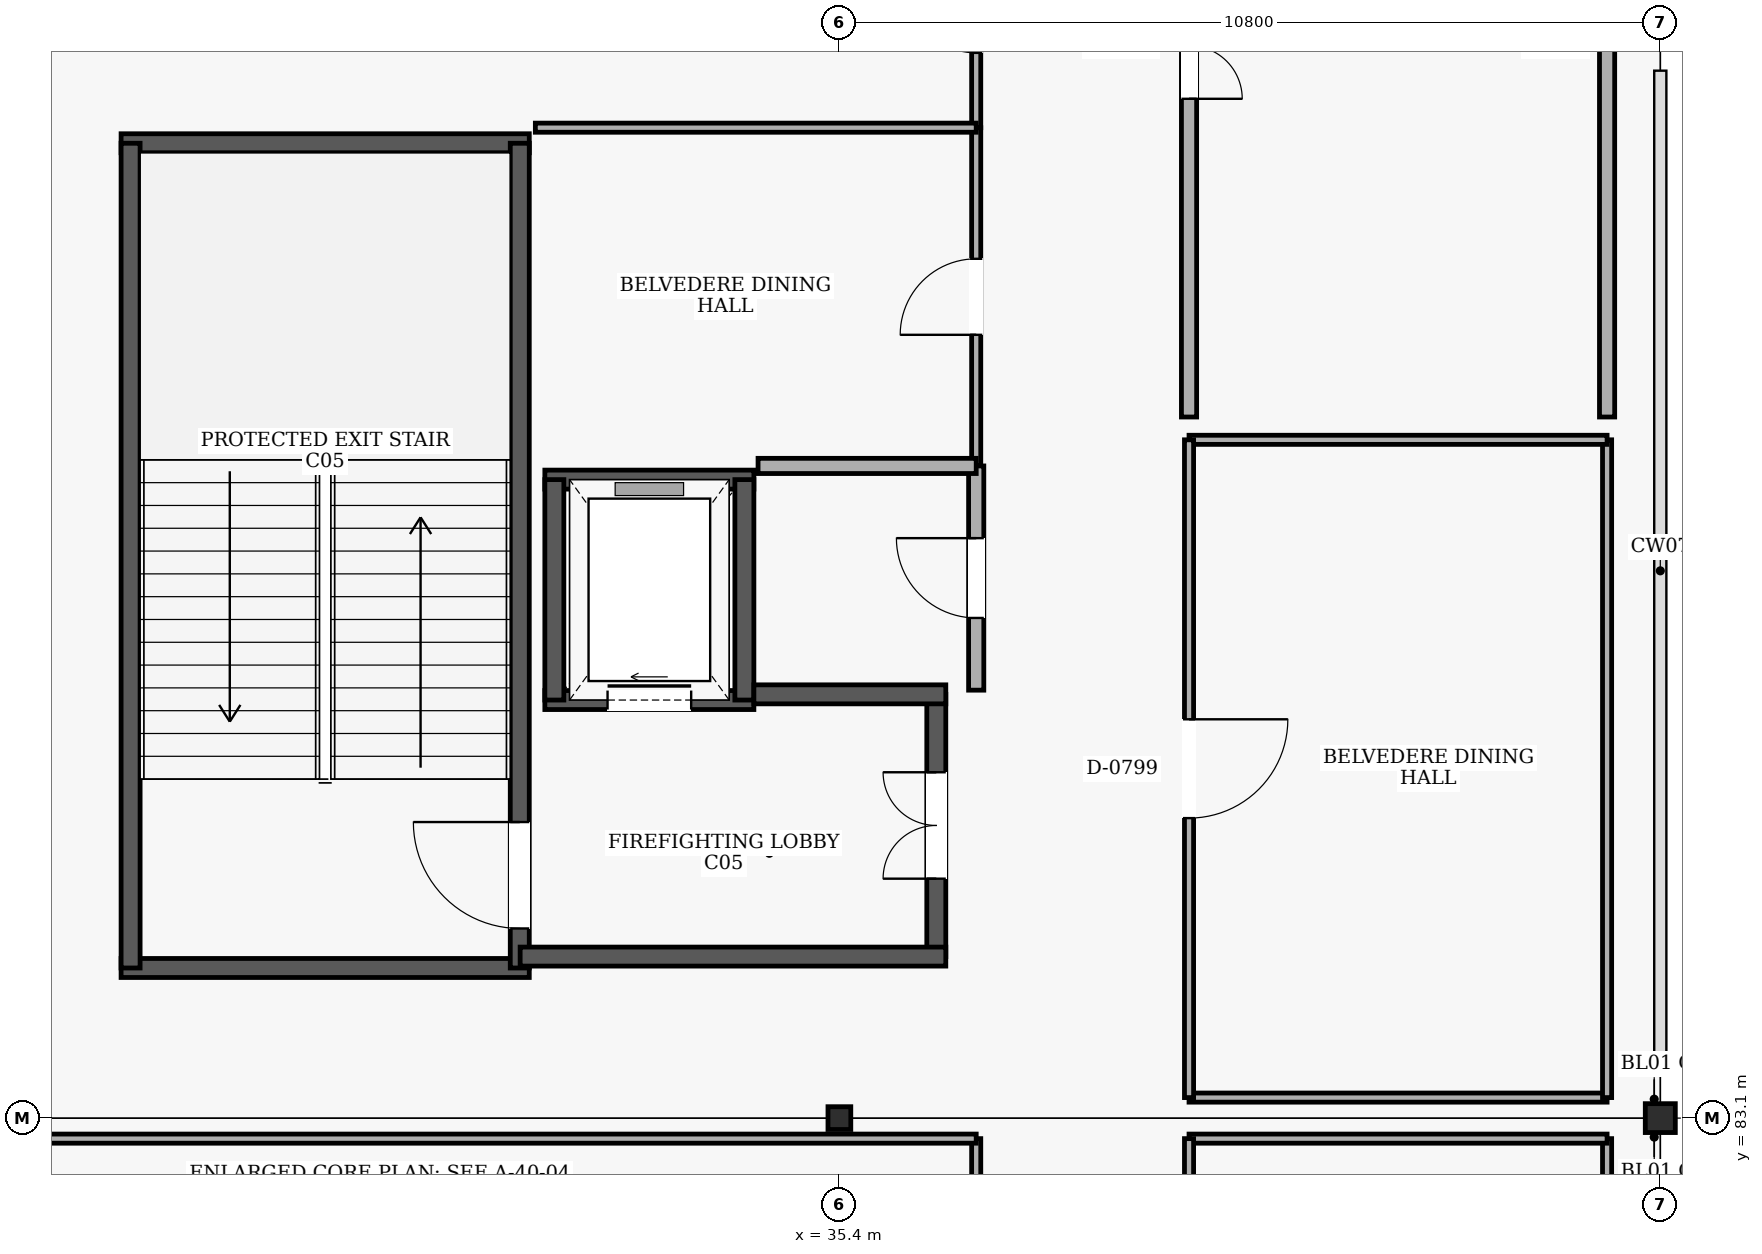
"""IFC4 building model, lengths in metres.
Left out: names, types, materials, properties, quantities, classifications, styles, units other than length and angle.
Written with IfcOpenShell. Run it as: python <this file> out.ifc"""

import sys

from ifc_helpers import new_model, si_unit, direction, frame, frame_2d, origin, origin_2d, place, context, subcontext, project, spatial, rectangle, hollow_rectangle, i_section, extrude, element, fill, save


model = new_model("IFC4")
c1 = context("Model", 3, precision=1e-05, world=origin(), true_north=direction((0.0, 1.0)))
c2 = subcontext(c1, "Body", "Model", "MODEL_VIEW")
j1 = project(units=[si_unit("LENGTHUNIT", "METRE"), si_unit("PLANEANGLEUNIT", "RADIAN")], contexts=[c1])
p1 = place(None, origin())
s1 = spatial("IfcSite", under=j1, at=p1, CompositionType="ELEMENT")
p2 = place(p1, origin())
s2 = spatial("IfcBuilding", under=s1, at=p2, CompositionType="ELEMENT")
p3 = place(p2, frame((0.0, 0.0, 24.6)))
s3 = spatial("IfcBuildingStorey", under=s2, at=p3, CompositionType="ELEMENT", Elevation=24.6)
p4 = place(p3, frame((35.4, 83.1, 0.0), z_axis=(0.0, 0.0, 1.0), x_axis=(1.0, 0.0, 0.0)))
e1 = element("IfcColumn", 1, at=p4, inside=s3, PredefinedType="COLUMN", context=c2, shape_type="SweptSolid", body=[
    extrude(hollow_rectangle(XDim=0.3, YDim=0.3, WallThickness=0.016, at=origin_2d()), origin(), (0.0, 0.0, 1.0), 4.8),
])
p5 = place(p3, frame((46.2, 83.1, 0.0), z_axis=(0.0, 0.0, 1.0), x_axis=(1.0, 0.0, 0.0)))
e2 = element("IfcColumn", 2, at=p5, inside=s3, PredefinedType="COLUMN", context=c2, shape_type="SweptSolid", body=[
    extrude(i_section(OverallWidth=0.395, OverallDepth=0.38, WebThickness=0.019, FlangeThickness=0.03, at=origin_2d()), origin(), (0.0, 0.0, 1.0), 4.8),
])
for number, where, z_axis, x_axis in (
    (3, (25.95, 85.075, 0.0), (0.0, 0.0, 1.0), (1.0, 0.0, 0.0)),
    (4, (31.32, 95.925, 0.0), (0.0, 0.0, 1.0), (-1.0, 0.0, 0.0)),
):
    element("IfcWall", number, at=place(p3, frame(where, z_axis=z_axis, x_axis=x_axis)), inside=s3, PredefinedType="SHEAR", context=c2, shape_type="SweptSolid", body=[
        extrude(rectangle(XDim=5.37, YDim=0.25, at=frame_2d((2.685, 0.0))), origin(), (0.0, 0.0, 1.0), 4.5),
    ])
p6 = place(p3, frame((26.075, 85.075, 0.0), z_axis=(0.0, 0.0, 1.0), x_axis=(0.0, 1.0, 0.0)))
e5 = element("IfcWall", 5, at=p6, inside=s3, PredefinedType="SHEAR", context=c2, shape_type="SweptSolid", body=[
    extrude(rectangle(XDim=10.85, YDim=0.25, at=frame_2d((5.425, 0.0))), origin(), (0.0, 0.0, 1.0), 4.5),
])
p7 = place(p3, frame((31.195, 85.075, 0.0), z_axis=(0.0, 0.0, 1.0), x_axis=(0.0, 1.0, 0.0)))
e6 = element("IfcWall", 6, at=p7, inside=s3, PredefinedType="SHEAR", context=c2, shape_type="SweptSolid", body=[
    extrude(rectangle(XDim=10.85, YDim=0.25, at=frame_2d((5.425, 0.0))), origin(), (0.0, 0.0, 1.0), 4.5),
])
p8 = place(p7, frame((0.52, 0.0, 0.0)))
e7 = element("IfcOpeningElement", 7, at=p8, cuts=e6, PredefinedType="OPENING", context=c2, shape_type="SweptSolid", body=[
    extrude(rectangle(XDim=1.4, YDim=2.15, at=frame_2d((0.7, 1.075))), frame((0.0, 0.135, 0.0), z_axis=(0.0, -1.0, 0.0), x_axis=(1.0, 0.0, 0.0)), (0.0, 0.0, 1.0), 0.27),
])
p9 = place(p3, frame((31.525, 88.6, 0.0), z_axis=(0.0, 0.0, 1.0), x_axis=(1.0, 0.0, 0.0)))
e8 = element("IfcWall", 8, at=p9, inside=s3, PredefinedType="SHEAR", context=c2, shape_type="SweptSolid", body=[
    extrude(rectangle(XDim=2.75, YDim=0.25, at=frame_2d((1.375, 0.0))), origin(), (0.0, 0.0, 1.0), 4.5),
])
p10 = place(p9, frame((0.825, 0.0, 0.0)))
e9 = element("IfcOpeningElement", 9, at=p10, cuts=e8, PredefinedType="OPENING", context=c2, shape_type="SweptSolid", body=[
    extrude(rectangle(XDim=1.1, YDim=2.15, at=frame_2d((0.55, 1.075))), frame((0.0, 0.135, 0.0), z_axis=(0.0, -1.0, 0.0), x_axis=(1.0, 0.0, 0.0)), (0.0, 0.0, 1.0), 0.27),
])
p11 = place(p3, frame((34.275, 91.5, 0.0), z_axis=(0.0, 0.0, 1.0), x_axis=(-1.0, 0.0, 0.0)))
e10 = element("IfcWall", 10, at=p11, inside=s3, PredefinedType="SHEAR", context=c2, shape_type="SweptSolid", body=[
    extrude(rectangle(XDim=2.75, YDim=0.25, at=frame_2d((1.375, 0.0))), origin(), (0.0, 0.0, 1.0), 4.5),
])
for number, where, z_axis, x_axis in (
    (11, (31.65, 91.5, 0.0), (0.0, 0.0, 1.0), (0.0, -1.0, 0.0)),
    (12, (34.15, 88.6, 0.0), (0.0, 0.0, 1.0), (0.0, 1.0, 0.0)),
):
    element("IfcWall", number, at=place(p3, frame(where, z_axis=z_axis, x_axis=x_axis)), inside=s3, PredefinedType="SHEAR", context=c2, shape_type="SweptSolid", body=[
        extrude(rectangle(XDim=2.9, YDim=0.25, at=frame_2d((1.45, 0.0))), origin(), (0.0, 0.0, 1.0), 4.5),
    ])
p12 = place(p3, frame((36.675, 85.225, 0.0), z_axis=(0.0, 0.0, 1.0), x_axis=(0.0, 1.0, 0.0)))
e13 = element("IfcWall", 13, at=p12, inside=s3, PredefinedType="SHEAR", context=c2, shape_type="SweptSolid", body=[
    extrude(rectangle(XDim=3.45, YDim=0.25, at=frame_2d((1.725, 0.0))), origin(), (0.0, 0.0, 1.0), 4.5),
])
p13 = place(p12, frame((1.025, 0.0, 0.0)))
e14 = element("IfcOpeningElement", 14, at=p13, cuts=e13, PredefinedType="OPENING", context=c2, shape_type="SweptSolid", body=[
    extrude(rectangle(XDim=1.4, YDim=2.15, at=frame_2d((0.7, 1.075))), frame((0.0, 0.135, 0.0), z_axis=(0.0, -1.0, 0.0), x_axis=(1.0, 0.0, 0.0)), (0.0, 0.0, 1.0), 0.27),
])
p14 = place(p3, frame((34.275, 88.675, 0.0), z_axis=(0.0, 0.0, 1.0), x_axis=(1.0, 0.0, 0.0)))
e15 = element("IfcWall", 15, at=p14, inside=s3, PredefinedType="SHEAR", context=c2, shape_type="SweptSolid", body=[
    extrude(rectangle(XDim=2.525, YDim=0.25, at=frame_2d((1.263, 0.0))), origin(), (0.0, 0.0, 1.0), 4.5),
])
p15 = place(p3, frame((31.2, 85.225, 0.0), z_axis=(0.0, 0.0, 1.0), x_axis=(1.0, 0.0, 0.0)))
e16 = element("IfcWall", 16, at=p15, inside=s3, PredefinedType="SHEAR", context=c2, shape_type="SweptSolid", body=[
    extrude(rectangle(XDim=5.6, YDim=0.25, at=frame_2d((2.8, 0.0))), origin(), (0.0, 0.0, 1.0), 4.5),
])
p16 = place(p3, frame((37.2, 79.73, 0.0), z_axis=(0.0, 0.0, 1.0), x_axis=(0.0, 1.0, 0.0)))
e17 = element("IfcWall", 17, at=p16, inside=s3, PredefinedType="PARTITIONING", context=c2, shape_type="SweptSolid", body=[
    extrude(rectangle(XDim=3.1, YDim=0.12, at=frame_2d((1.55, 0.0))), origin(), (0.0, 0.0, 1.0), 4.5),
])
p17 = place(p16, frame((1.07, 0.0, 0.0)))
e18 = element("IfcOpeningElement", 18, at=p17, cuts=e17, PredefinedType="OPENING", context=c2, shape_type="SweptSolid", body=[
    extrude(rectangle(XDim=0.96, YDim=2.1, at=frame_2d((0.48, 1.05))), frame((0.0, 0.07, 0.0), z_axis=(0.0, -1.0, 0.0), x_axis=(1.0, 0.0, 0.0)), (0.0, 0.0, 1.0), 0.14),
])
p18 = place(p3, frame((37.2, 82.83, 0.0), z_axis=(0.0, 0.0, 1.0), x_axis=(-1.0, 0.0, 0.0)))
e19 = element("IfcWall", 19, at=p18, inside=s3, PredefinedType="PARTITIONING", context=c2, shape_type="SweptSolid", body=[
    extrude(rectangle(XDim=12.355, YDim=0.12, at=frame_2d((6.177, 0.0))), origin(), (0.0, 0.0, 1.0), 3.78),
])
p19 = place(p3, frame((45.5, 70.849, 0.0), z_axis=(0.0, 0.0, 1.0), x_axis=(0.0, 1.0, 0.0)))
e20 = element("IfcWall", 20, at=p19, inside=s3, PredefinedType="PARTITIONING", context=c2, shape_type="SweptSolid", body=[
    extrude(rectangle(XDim=11.981, YDim=0.12, at=frame_2d((5.99, 0.0))), origin(), (0.0, 0.0, 1.0), 4.5),
])
p20 = place(p3, frame((45.5, 82.83, 0.0), z_axis=(0.0, 0.0, 1.0), x_axis=(-1.0, 0.0, 0.0)))
e21 = element("IfcWall", 21, at=p20, inside=s3, PredefinedType="PARTITIONING", context=c2, shape_type="SweptSolid", body=[
    extrude(rectangle(XDim=5.5, YDim=0.12, at=frame_2d((2.75, 0.0))), origin(), (0.0, 0.0, 1.0), 3.78),
])
p21 = place(p3, frame((40.0, 82.83, 0.0), z_axis=(0.0, 0.0, 1.0), x_axis=(0.0, -1.0, 0.0)))
e22 = element("IfcWall", 22, at=p21, inside=s3, PredefinedType="PARTITIONING", context=c2, shape_type="SweptSolid", body=[
    extrude(rectangle(XDim=11.981, YDim=0.12, at=frame_2d((5.99, 0.0))), origin(), (0.0, 0.0, 1.0), 4.5),
])
p22 = place(p21, frame((5.531, 0.0, 0.0)))
e23 = element("IfcOpeningElement", 23, at=p22, cuts=e22, PredefinedType="OPENING", context=c2, shape_type="SweptSolid", body=[
    extrude(rectangle(XDim=0.92, YDim=2.1, at=frame_2d((0.46, 1.05))), frame((0.0, 0.07, 0.0), z_axis=(0.0, -1.0, 0.0), x_axis=(1.0, 0.0, 0.0)), (0.0, 0.0, 1.0), 0.14),
])
p23 = place(p3, frame((37.2, 96.13, 0.0), z_axis=(0.0, 0.0, 1.0), x_axis=(0.0, 1.0, 0.0)))
e24 = element("IfcWall", 24, at=p23, inside=s3, PredefinedType="PARTITIONING", context=c2, shape_type="SweptSolid", body=[
    extrude(rectangle(XDim=2.889, YDim=0.12, at=frame_2d((1.444, 0.0))), origin(), (0.0, 0.0, 1.0), 4.5),
])
p24 = place(p23, frame((0.984, 0.0, 0.0)))
e25 = element("IfcOpeningElement", 25, at=p24, cuts=e24, PredefinedType="OPENING", context=c2, shape_type="SweptSolid", body=[
    extrude(rectangle(XDim=0.92, YDim=2.1, at=frame_2d((0.46, 1.05))), frame((0.0, 0.07, 0.0), z_axis=(0.0, -1.0, 0.0), x_axis=(1.0, 0.0, 0.0)), (0.0, 0.0, 1.0), 0.14),
])
p25 = place(p3, frame((37.2, 91.68, 0.0), z_axis=(0.0, 0.0, 1.0), x_axis=(0.0, 1.0, 0.0)))
e26 = element("IfcWall", 26, at=p25, inside=s3, PredefinedType="PARTITIONING", context=c2, shape_type="SweptSolid", body=[
    extrude(rectangle(XDim=4.45, YDim=0.12, at=frame_2d((2.225, 0.0))), origin(), (0.0, 0.0, 1.0), 4.5),
])
p26 = place(p25, frame((1.725, 0.0, 0.0)))
e27 = element("IfcOpeningElement", 27, at=p26, cuts=e26, PredefinedType="OPENING", context=c2, shape_type="SweptSolid", body=[
    extrude(rectangle(XDim=1.0, YDim=2.1, at=frame_2d((0.5, 1.05))), frame((0.0, 0.07, 0.0), z_axis=(0.0, -1.0, 0.0), x_axis=(1.0, 0.0, 0.0)), (0.0, 0.0, 1.0), 0.14),
])
p27 = place(p3, frame((37.2, 96.13, 0.0), z_axis=(0.0, 0.0, 1.0), x_axis=(-1.0, 0.0, 0.0)))
e28 = element("IfcWall", 28, at=p27, inside=s3, PredefinedType="PARTITIONING", context=c2, shape_type="SweptSolid", body=[
    extrude(rectangle(XDim=5.8, YDim=0.12, at=frame_2d((2.9, 0.0))), origin(), (0.0, 0.0, 1.0), 4.5),
])
p28 = place(p3, frame((37.2, 88.73, 0.0), z_axis=(0.0, 0.0, 1.0), x_axis=(0.0, 1.0, 0.0)))
e29 = element("IfcWall", 29, at=p28, inside=s3, PredefinedType="PARTITIONING", context=c2, shape_type="SweptSolid", body=[
    extrude(rectangle(XDim=2.95, YDim=0.2, at=frame_2d((1.475, 0.0))), origin(), (0.0, 0.0, 1.0), 4.5),
])
p29 = place(p28, frame((0.95, 0.0, 0.0)))
e30 = element("IfcOpeningElement", 30, at=p29, cuts=e29, PredefinedType="OPENING", context=c2, shape_type="SweptSolid", body=[
    extrude(rectangle(XDim=1.05, YDim=2.15, at=frame_2d((0.525, 1.075))), frame((0.0, 0.11, 0.0), z_axis=(0.0, -1.0, 0.0), x_axis=(1.0, 0.0, 0.0)), (0.0, 0.0, 1.0), 0.22),
])
p30 = place(p3, frame((37.2, 91.68, 0.0), z_axis=(0.0, 0.0, 1.0), x_axis=(-1.0, 0.0, 0.0)))
e31 = element("IfcWall", 31, at=p30, inside=s3, PredefinedType="PARTITIONING", context=c2, shape_type="SweptSolid", body=[
    extrude(rectangle(XDim=2.87, YDim=0.2, at=frame_2d((1.435, 0.0))), origin(), (0.0, 0.0, 1.0), 4.5),
])
p31 = place(p3, frame((40.0, 83.37, 0.0), z_axis=(0.0, 0.0, 1.0), x_axis=(1.0, 0.0, 0.0)))
e32 = element("IfcWall", 32, at=p31, inside=s3, PredefinedType="PARTITIONING", context=c2, shape_type="SweptSolid", body=[
    extrude(rectangle(XDim=5.5, YDim=0.12, at=frame_2d((2.75, 0.0))), origin(), (0.0, 0.0, 1.0), 3.78),
])
p32 = place(p3, frame((45.5, 83.37, 0.0), z_axis=(0.0, 0.0, 1.0), x_axis=(0.0, 1.0, 0.0)))
e33 = element("IfcWall", 33, at=p32, inside=s3, PredefinedType="PARTITIONING", context=c2, shape_type="SweptSolid", body=[
    extrude(rectangle(XDim=8.654, YDim=0.12, at=frame_2d((4.327, 0.0))), origin(), (0.0, 0.0, 1.0), 4.5),
])
p33 = place(p3, frame((45.5, 92.024, 0.0), z_axis=(0.0, 0.0, 1.0), x_axis=(-1.0, 0.0, 0.0)))
e34 = element("IfcWall", 34, at=p33, inside=s3, PredefinedType="PARTITIONING", context=c2, shape_type="SweptSolid", body=[
    extrude(rectangle(XDim=5.5, YDim=0.12, at=frame_2d((2.75, 0.0))), origin(), (0.0, 0.0, 1.0), 4.5),
])
p34 = place(p3, frame((40.0, 92.024, 0.0), z_axis=(0.0, 0.0, 1.0), x_axis=(0.0, -1.0, 0.0)))
e35 = element("IfcWall", 35, at=p34, inside=s3, PredefinedType="PARTITIONING", context=c2, shape_type="SweptSolid", body=[
    extrude(rectangle(XDim=8.654, YDim=0.12, at=frame_2d((4.327, 0.0))), origin(), (0.0, 0.0, 1.0), 4.5),
])
p35 = place(p34, frame((3.677, 0.0, 0.0)))
e36 = element("IfcOpeningElement", 36, at=p35, cuts=e35, PredefinedType="OPENING", context=c2, shape_type="SweptSolid", body=[
    extrude(rectangle(XDim=1.3, YDim=2.2, at=frame_2d((0.65, 1.1))), frame((0.0, 0.07, 0.0), z_axis=(0.0, -1.0, 0.0), x_axis=(1.0, 0.0, 0.0)), (0.0, 0.0, 1.0), 0.14),
])
p36 = place(p3, frame((45.5, 92.323, 0.0), z_axis=(0.0, 0.0, 1.0), x_axis=(0.0, 1.0, 0.0)))
e37 = element("IfcWall", 37, at=p36, inside=s3, PredefinedType="PARTITIONING", context=c2, shape_type="SweptSolid", body=[
    extrude(rectangle(XDim=9.773, YDim=0.2, at=frame_2d((4.886, 0.0))), origin(), (0.0, 0.0, 1.0), 4.5),
])
p37 = place(p3, frame((40.0, 102.096, 0.0), z_axis=(0.0, 0.0, 1.0), x_axis=(0.0, -1.0, 0.0)))
e38 = element("IfcWall", 38, at=p37, inside=s3, PredefinedType="PARTITIONING", context=c2, shape_type="SweptSolid", body=[
    extrude(rectangle(XDim=9.773, YDim=0.2, at=frame_2d((4.886, 0.0))), origin(), (0.0, 0.0, 1.0), 4.5),
])
p38 = place(p37, frame((4.186, 0.0, 0.0)))
e39 = element("IfcOpeningElement", 39, at=p38, cuts=e38, PredefinedType="OPENING", context=c2, shape_type="SweptSolid", body=[
    extrude(rectangle(XDim=1.4, YDim=2.2, at=frame_2d((0.7, 1.1))), frame((0.0, 0.11, 0.0), z_axis=(0.0, -1.0, 0.0), x_axis=(1.0, 0.0, 0.0)), (0.0, 0.0, 1.0), 0.22),
])
p39 = place(p8, origin())
e40 = element("IfcDoor", 40, at=p39, inside=s3, OperationType="SINGLE_SWING_RIGHT", PredefinedType="DOOR", context=c2, shape_type="SweptSolid", body=[
    extrude(rectangle(XDim=1.4, YDim=2.15, at=frame_2d((0.7, 1.075))), frame((0.0, 0.025, 0.0), z_axis=(0.0, -1.0, 0.0), x_axis=(1.0, 0.0, 0.0)), (0.0, 0.0, 1.0), 0.05),
])
fill(e7, e40)
p40 = place(p10, origin())
e41 = element("IfcDoor", 41, at=p40, inside=s3, OperationType="SLIDING_TO_RIGHT", PredefinedType="DOOR", context=c2, shape_type="SweptSolid", body=[
    extrude(rectangle(XDim=1.1, YDim=2.15, at=frame_2d((0.55, 1.075))), frame((0.0, 0.025, 0.0), z_axis=(0.0, -1.0, 0.0), x_axis=(1.0, 0.0, 0.0)), (0.0, 0.0, 1.0), 0.05),
])
fill(e9, e41)
p41 = place(p13, origin())
e42 = element("IfcDoor", 42, at=p41, inside=s3, OperationType="DOUBLE_DOOR_SINGLE_SWING", PredefinedType="DOOR", context=c2, shape_type="SweptSolid", body=[
    extrude(rectangle(XDim=1.4, YDim=2.15, at=frame_2d((0.7, 1.075))), frame((0.0, 0.025, 0.0), z_axis=(0.0, -1.0, 0.0), x_axis=(1.0, 0.0, 0.0)), (0.0, 0.0, 1.0), 0.05),
])
fill(e14, e42)
p42 = place(p24, origin())
e43 = element("IfcDoor", 43, at=p42, inside=s3, OperationType="SINGLE_SWING_RIGHT", PredefinedType="DOOR", context=c2, shape_type="SweptSolid", body=[
    extrude(rectangle(XDim=0.92, YDim=2.1, at=frame_2d((0.46, 1.05))), frame((0.0, 0.025, 0.0), z_axis=(0.0, -1.0, 0.0), x_axis=(1.0, 0.0, 0.0)), (0.0, 0.0, 1.0), 0.05),
])
fill(e25, e43)
p43 = place(p26, origin())
e44 = element("IfcDoor", 44, at=p43, inside=s3, OperationType="SINGLE_SWING_LEFT", PredefinedType="DOOR", context=c2, shape_type="SweptSolid", body=[
    extrude(rectangle(XDim=1.0, YDim=2.1, at=frame_2d((0.5, 1.05))), frame((0.0, 0.025, 0.0), z_axis=(0.0, -1.0, 0.0), x_axis=(1.0, 0.0, 0.0)), (0.0, 0.0, 1.0), 0.05),
])
fill(e27, e44)
p44 = place(p29, origin())
e45 = element("IfcDoor", 45, at=p44, inside=s3, OperationType="SINGLE_SWING_RIGHT", PredefinedType="DOOR", context=c2, shape_type="SweptSolid", body=[
    extrude(rectangle(XDim=1.05, YDim=2.15, at=frame_2d((0.525, 1.075))), frame((0.0, 0.025, 0.0), z_axis=(0.0, -1.0, 0.0), x_axis=(1.0, 0.0, 0.0)), (0.0, 0.0, 1.0), 0.05),
])
fill(e30, e45)
p45 = place(p35, origin())
e46 = element("IfcDoor", 46, at=p45, inside=s3, OperationType="SINGLE_SWING_LEFT", PredefinedType="DOOR", context=c2, shape_type="SweptSolid", body=[
    extrude(rectangle(XDim=1.3, YDim=2.2, at=frame_2d((0.65, 1.1))), frame((0.0, 0.025, 0.0), z_axis=(0.0, -1.0, 0.0), x_axis=(1.0, 0.0, 0.0)), (0.0, 0.0, 1.0), 0.05),
])
fill(e36, e46)
p46 = place(p38, origin())
e47 = element("IfcDoor", 47, at=p46, inside=s3, OperationType="DOUBLE_DOOR_SINGLE_SWING", PredefinedType="DOOR", context=c2, shape_type="SweptSolid", body=[
    extrude(rectangle(XDim=1.4, YDim=2.2, at=frame_2d((0.7, 1.1))), frame((0.0, 0.025, 0.0), z_axis=(0.0, -1.0, 0.0), x_axis=(1.0, 0.0, 0.0)), (0.0, 0.0, 1.0), 0.05),
])
fill(e39, e47)
save(model, sys.argv[1])
